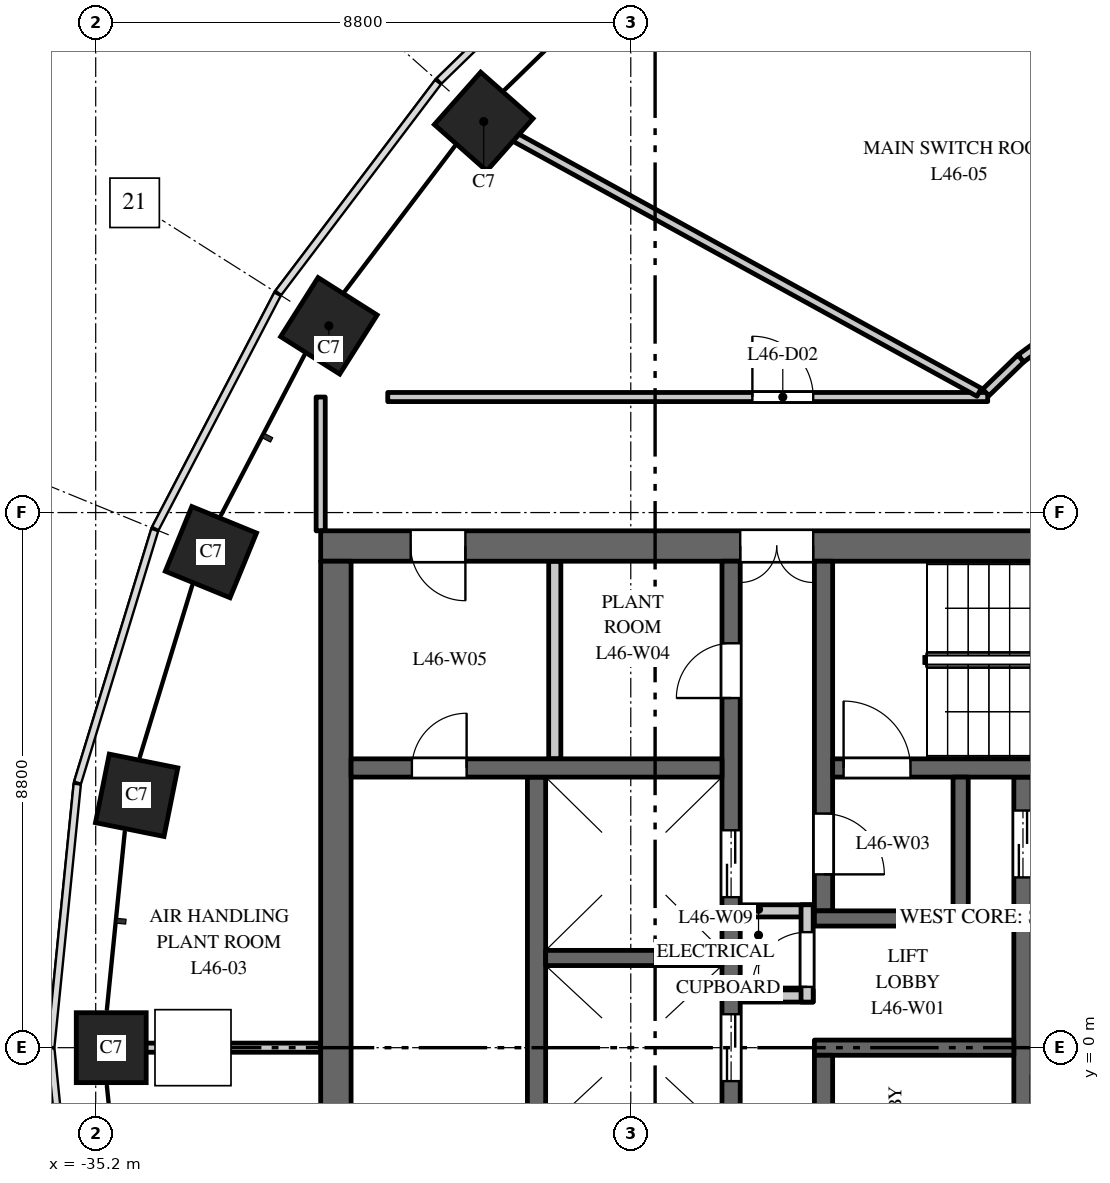
"""IFC4 building model, lengths in metres.
Left out: names, types, materials, properties, quantities, classifications, styles, units other than length and angle.
Written with IfcOpenShell. Run it as: python <this file> out.ifc"""

import sys

from ifc_helpers import new_model, si_unit, direction, frame, frame_2d, origin, origin_2d, place, context, subcontext, project, spatial, rectangle, extrude, element, fill, save


model = new_model("IFC4")
c1 = context("Model", 3, precision=1e-05, world=origin(), true_north=direction((0.0, 1.0)))
c2 = subcontext(c1, "Body", "Model", "MODEL_VIEW")
j1 = project(units=[si_unit("LENGTHUNIT", "METRE"), si_unit("PLANEANGLEUNIT", "RADIAN")], contexts=[c1])
p1 = place(None, origin())
s1 = spatial("IfcSite", under=j1, at=p1, CompositionType="ELEMENT")
p2 = place(p1, origin())
s2 = spatial("IfcBuilding", under=s1, at=p2, CompositionType="ELEMENT")
p3 = place(p2, frame((0.0, 0.0, 198.0)))
s3 = spatial("IfcBuildingStorey", under=s2, at=p3, CompositionType="ELEMENT", Elevation=198.0)
for number, where, z_axis, x_axis in (
    (1, (-28.819, 15.23, 0.0), (0.0, 0.0, 1.0), (-0.663, -0.749, 0.0)),
    (2, (-31.365, 11.871, 0.0), (0.0, 0.0, 1.0), (-0.535, -0.845, 0.0)),
    (3, (-33.305, 8.149, 0.0), (0.0, 0.0, 1.0), (-0.379, -0.925, 0.0)),
    (4, (-34.527, 4.151, 0.0), (0.0, 0.0, 1.0), (-0.197, -0.98, 0.0)),
    (5, (-34.945, 0.0, 0.0), (0.0, 0.0, 1.0), (0.0, -1.0, 0.0)),
):
    element("IfcColumn", number, at=place(p3, frame(where, z_axis=z_axis, x_axis=x_axis)), inside=s3, PredefinedType="COLUMN", context=c2, shape_type="SweptSolid", body=[
        extrude(rectangle(XDim=1.15, YDim=1.15, at=origin_2d()), origin(), (0.0, 0.0, 1.0), 5.5),
    ])
p4 = place(p3, frame((-16.5, 8.25, 0.0), z_axis=(0.0, 0.0, 1.0), x_axis=(-1.0, 0.0, 0.0)))
e6 = element("IfcWall", 6, at=p4, inside=s3, PredefinedType="SHEAR", context=c2, shape_type="SweptSolid", body=[
    extrude(rectangle(XDim=15.0, YDim=0.5, at=frame_2d((7.5, 0.0))), origin(), (0.0, 0.0, 1.0), 5.15),
])
p5 = place(p4, frame((6.9, 0.0, 0.0)))
e7 = element("IfcOpeningElement", 7, at=p5, cuts=e6, PredefinedType="OPENING", context=c2, shape_type="SweptSolid", body=[
    extrude(rectangle(XDim=1.2, YDim=2.1, at=frame_2d((0.6, 1.05))), frame((0.0, 0.26, 0.0), z_axis=(0.0, -1.0, 0.0), x_axis=(1.0, 0.0, 0.0)), (0.0, 0.0, 1.0), 0.52),
])
p6 = place(p4, frame((12.62, 0.0, 0.0)))
e8 = element("IfcOpeningElement", 8, at=p6, cuts=e6, PredefinedType="OPENING", context=c2, shape_type="SweptSolid", body=[
    extrude(rectangle(XDim=0.9, YDim=2.1, at=frame_2d((0.45, 1.05))), frame((0.0, 0.26, 0.0), z_axis=(0.0, -1.0, 0.0), x_axis=(1.0, 0.0, 0.0)), (0.0, 0.0, 1.0), 0.52),
])
p7 = place(p3, frame((-27.95, -4.45, 0.0), z_axis=(0.0, 0.0, 1.0), x_axis=(0.0, 1.0, 0.0)))
e9 = element("IfcWall", 9, at=p7, inside=s3, PredefinedType="SHEAR", context=c2, shape_type="SweptSolid", body=[
    extrude(rectangle(XDim=8.9, YDim=0.3, at=frame_2d((4.45, 0.0))), origin(), (0.0, 0.0, 1.0), 5.15),
])
p8 = place(p3, frame((-19.95, -4.45, 0.0), z_axis=(0.0, 0.0, 1.0), x_axis=(0.0, 1.0, 0.0)))
e10 = element("IfcWall", 10, at=p8, inside=s3, PredefinedType="SHEAR", context=c2, shape_type="SweptSolid", body=[
    extrude(rectangle(XDim=8.9, YDim=0.3, at=frame_2d((4.45, 0.0))), origin(), (0.0, 0.0, 1.0), 5.15),
])
p9 = place(p8, frame((0.775, 0.0, 0.0)))
e11 = element("IfcOpeningElement", 11, at=p9, cuts=e10, PredefinedType="OPENING", context=c2, shape_type="SweptSolid", body=[
    extrude(rectangle(XDim=1.2, YDim=2.1, at=frame_2d((0.6, 1.05))), frame((0.0, 0.16, 0.0), z_axis=(0.0, -1.0, 0.0), x_axis=(1.0, 0.0, 0.0)), (0.0, 0.0, 1.0), 0.32),
])
p10 = place(p8, frame((7.25, 0.0, 0.0)))
e12 = element("IfcOpeningElement", 12, at=p10, cuts=e10, PredefinedType="OPENING", context=c2, shape_type="SweptSolid", body=[
    extrude(rectangle(XDim=1.1, YDim=2.1, at=frame_2d((0.55, 1.05))), frame((0.0, 0.16, 0.0), z_axis=(0.0, -1.0, 0.0), x_axis=(1.0, 0.0, 0.0)), (0.0, 0.0, 1.0), 0.32),
])
p11 = place(p3, frame((-24.75, -8.0, 0.0), z_axis=(0.0, 0.0, 1.0), x_axis=(0.0, 1.0, 0.0)))
e13 = element("IfcWall", 13, at=p11, inside=s3, PredefinedType="SHEAR", context=c2, shape_type="SweptSolid", body=[
    extrude(rectangle(XDim=16.0, YDim=0.3, at=frame_2d((8.0, 0.0))), origin(), (0.0, 0.0, 1.0), 5.15),
])
p12 = place(p11, frame((4.425, 0.0, 0.0)))
e14 = element("IfcOpeningElement", 14, at=p12, cuts=e13, PredefinedType="OPENING", context=c2, shape_type="SweptSolid", body=[
    extrude(rectangle(XDim=1.1, YDim=2.1, at=frame_2d((0.55, 1.05))), frame((0.0, 0.16, 0.0), z_axis=(0.0, -1.0, 0.0), x_axis=(1.0, 0.0, 0.0)), (0.0, 0.0, 1.0), 0.32),
])
p13 = place(p11, frame((7.45, 0.0, 0.0)))
e15 = element("IfcOpeningElement", 15, at=p13, cuts=e13, PredefinedType="OPENING", context=c2, shape_type="SweptSolid", body=[
    extrude(rectangle(XDim=1.1, YDim=2.1, at=frame_2d((0.55, 1.05))), frame((0.0, 0.16, 0.0), z_axis=(0.0, -1.0, 0.0), x_axis=(1.0, 0.0, 0.0)), (0.0, 0.0, 1.0), 0.32),
])
p14 = place(p11, frame((10.475, 0.0, 0.0)))
e16 = element("IfcOpeningElement", 16, at=p14, cuts=e13, PredefinedType="OPENING", context=c2, shape_type="SweptSolid", body=[
    extrude(rectangle(XDim=1.1, YDim=2.1, at=frame_2d((0.55, 1.05))), frame((0.0, 0.16, 0.0), z_axis=(0.0, -1.0, 0.0), x_axis=(1.0, 0.0, 0.0)), (0.0, 0.0, 1.0), 0.32),
])
p15 = place(p11, frame((13.75, 0.0, 0.0)))
e17 = element("IfcOpeningElement", 17, at=p15, cuts=e13, PredefinedType="OPENING", context=c2, shape_type="SweptSolid", body=[
    extrude(rectangle(XDim=0.9, YDim=2.1, at=frame_2d((0.45, 1.05))), frame((0.0, 0.16, 0.0), z_axis=(0.0, -1.0, 0.0), x_axis=(1.0, 0.0, 0.0)), (0.0, 0.0, 1.0), 0.32),
])
p16 = place(p11, frame((1.975, 0.0, 0.0)))
e18 = element("IfcOpeningElement", 18, at=p16, cuts=e13, PredefinedType="OPENING", context=c2, shape_type="SweptSolid", body=[
    extrude(rectangle(XDim=0.9, YDim=2.1, at=frame_2d((0.45, 1.05))), frame((0.0, 0.16, 0.0), z_axis=(0.0, -1.0, 0.0), x_axis=(1.0, 0.0, 0.0)), (0.0, 0.0, 1.0), 0.32),
])
p17 = place(p11, frame((0.35, 0.0, 0.0)))
e19 = element("IfcOpeningElement", 19, at=p17, cuts=e13, PredefinedType="OPENING", context=c2, shape_type="SweptSolid", body=[
    extrude(rectangle(XDim=0.9, YDim=2.1, at=frame_2d((0.45, 1.05))), frame((0.0, 0.16, 0.0), z_axis=(0.0, -1.0, 0.0), x_axis=(1.0, 0.0, 0.0)), (0.0, 0.0, 1.0), 0.32),
])
p18 = place(p3, frame((-20.1, 0.0, 0.0), z_axis=(0.0, 0.0, 1.0), x_axis=(-1.0, 0.0, 0.0)))
e20 = element("IfcWall", 20, at=p18, inside=s3, PredefinedType="SHEAR", context=c2, shape_type="SweptSolid", body=[
    extrude(rectangle(XDim=3.28, YDim=0.25, at=frame_2d((1.64, 0.0))), origin(), (0.0, 0.0, 1.0), 5.15),
])
for number, where, z_axis, x_axis in (
    (21, (-23.4, 0.85, 0.0), (0.0, 0.0, 1.0), (-1.0, 0.0, 0.0)),
    (22, (-23.4, 2.25, 0.0), (0.0, 0.0, 1.0), (-1.0, 0.0, 0.0)),
):
    element("IfcWall", number, at=place(p3, frame(where, z_axis=z_axis, x_axis=x_axis)), inside=s3, PredefinedType="PARTITIONING", context=c2, shape_type="SweptSolid", body=[
        extrude(rectangle(XDim=1.2, YDim=0.2, at=frame_2d((0.6, 0.0))), origin(), (0.0, 0.0, 1.0), 5.15),
    ])
p19 = place(p3, frame((-23.5, 0.75, 0.0), z_axis=(0.0, 0.0, 1.0), x_axis=(0.0, 1.0, 0.0)))
e23 = element("IfcWall", 23, at=p19, inside=s3, PredefinedType="PARTITIONING", context=c2, shape_type="SweptSolid", body=[
    extrude(rectangle(XDim=1.6, YDim=0.2, at=frame_2d((0.8, 0.0))), origin(), (0.0, 0.0, 1.0), 5.15),
])
p20 = place(p19, frame((0.25, 0.0, 0.0)))
e24 = element("IfcOpeningElement", 24, at=p20, cuts=e23, PredefinedType="OPENING", context=c2, shape_type="SweptSolid", body=[
    extrude(rectangle(XDim=0.9, YDim=2.1, at=frame_2d((0.45, 1.05))), frame((0.0, 0.11, 0.0), z_axis=(0.0, -1.0, 0.0), x_axis=(1.0, 0.0, 0.0)), (0.0, 0.0, 1.0), 0.22),
])
p21 = place(p3, frame((-31.25, -8.0, 0.0), z_axis=(0.0, 0.0, 1.0), x_axis=(0.0, 1.0, 0.0)))
e25 = element("IfcWall", 25, at=p21, inside=s3, PredefinedType="SHEAR", context=c2, shape_type="SweptSolid", body=[
    extrude(rectangle(XDim=16.0, YDim=0.5, at=frame_2d((8.0, 0.0))), origin(), (0.0, 0.0, 1.0), 5.15),
])
p22 = place(p3, frame((-24.9, 4.6, 0.0), z_axis=(0.0, 0.0, 1.0), x_axis=(-1.0, 0.0, 0.0)))
e26 = element("IfcWall", 26, at=p22, inside=s3, PredefinedType="SHEAR", context=c2, shape_type="SweptSolid", body=[
    extrude(rectangle(XDim=6.1, YDim=0.3, at=frame_2d((3.05, 0.0))), origin(), (0.0, 0.0, 1.0), 5.15),
])
p23 = place(p22, frame((4.2, 0.0, 0.0)))
e27 = element("IfcOpeningElement", 27, at=p23, cuts=e26, PredefinedType="OPENING", context=c2, shape_type="SweptSolid", body=[
    extrude(rectangle(XDim=0.9, YDim=2.1, at=frame_2d((0.45, 1.05))), frame((0.0, 0.16, 0.0), z_axis=(0.0, -1.0, 0.0), x_axis=(1.0, 0.0, 0.0)), (0.0, 0.0, 1.0), 0.32),
])
p24 = place(p3, frame((-27.65, 4.75, 0.0), z_axis=(0.0, 0.0, 1.0), x_axis=(0.0, 1.0, 0.0)))
e28 = element("IfcWall", 28, at=p24, inside=s3, PredefinedType="PARTITIONING", context=c2, shape_type="SweptSolid", body=[
    extrude(rectangle(XDim=3.25, YDim=0.2, at=frame_2d((1.625, 0.0))), origin(), (0.0, 0.0, 1.0), 5.15),
])
p25 = place(p3, frame((-24.9, 1.475, 0.0), z_axis=(0.0, 0.0, 1.0), x_axis=(-1.0, 0.0, 0.0)))
e29 = element("IfcWall", 29, at=p25, inside=s3, PredefinedType="SHEAR", context=c2, shape_type="SweptSolid", body=[
    extrude(rectangle(XDim=2.9, YDim=0.25, at=frame_2d((1.45, 0.0))), origin(), (0.0, 0.0, 1.0), 5.15),
])
p26 = place(p3, frame((-23.23, 2.25, 0.0), z_axis=(0.0, 0.0, 1.0), x_axis=(0.0, 1.0, 0.0)))
e30 = element("IfcWall", 30, at=p26, inside=s3, PredefinedType="SHEAR", context=c2, shape_type="SweptSolid", body=[
    extrude(rectangle(XDim=5.75, YDim=0.3, at=frame_2d((2.875, 0.0))), origin(), (0.0, 0.0, 1.0), 5.15),
])
p27 = place(p26, frame((0.6, 0.0, 0.0)))
e31 = element("IfcOpeningElement", 31, at=p27, cuts=e30, PredefinedType="OPENING", context=c2, shape_type="SweptSolid", body=[
    extrude(rectangle(XDim=1.0, YDim=2.1, at=frame_2d((0.5, 1.05))), frame((0.0, 0.16, 0.0), z_axis=(0.0, -1.0, 0.0), x_axis=(1.0, 0.0, 0.0)), (0.0, 0.0, 1.0), 0.32),
])
p28 = place(p3, frame((-23.23, -8.0, 0.0), z_axis=(0.0, 0.0, 1.0), x_axis=(0.0, 1.0, 0.0)))
e32 = element("IfcWall", 32, at=p28, inside=s3, PredefinedType="SHEAR", context=c2, shape_type="SweptSolid", body=[
    extrude(rectangle(XDim=7.875, YDim=0.3, at=frame_2d((3.938, 0.0))), origin(), (0.0, 0.0, 1.0), 5.15),
])
p29 = place(p28, frame((5.15, 0.0, 0.0)))
e33 = element("IfcOpeningElement", 33, at=p29, cuts=e32, PredefinedType="OPENING", context=c2, shape_type="SweptSolid", body=[
    extrude(rectangle(XDim=1.1, YDim=2.1, at=frame_2d((0.55, 1.05))), frame((0.0, 0.16, 0.0), z_axis=(0.0, -1.0, 0.0), x_axis=(1.0, 0.0, 0.0)), (0.0, 0.0, 1.0), 0.32),
])
p30 = place(p3, frame((-16.9, 4.6, 0.0), z_axis=(0.0, 0.0, 1.0), x_axis=(-1.0, 0.0, 0.0)))
e34 = element("IfcWall", 34, at=p30, inside=s3, PredefinedType="SHEAR", context=c2, shape_type="SweptSolid", body=[
    extrude(rectangle(XDim=6.18, YDim=0.3, at=frame_2d((3.09, 0.0))), origin(), (0.0, 0.0, 1.0), 5.15),
])
p31 = place(p30, frame((4.9, 0.0, 0.0)))
e35 = element("IfcOpeningElement", 35, at=p31, cuts=e34, PredefinedType="OPENING", context=c2, shape_type="SweptSolid", body=[
    extrude(rectangle(XDim=1.1, YDim=2.1, at=frame_2d((0.55, 1.05))), frame((0.0, 0.16, 0.0), z_axis=(0.0, -1.0, 0.0), x_axis=(1.0, 0.0, 0.0)), (0.0, 0.0, 1.0), 0.32),
])
p32 = place(p3, frame((-20.85, 2.125, 0.0), z_axis=(0.0, 0.0, 1.0), x_axis=(-1.0, 0.0, 0.0)))
e36 = element("IfcWall", 36, at=p32, inside=s3, PredefinedType="SHEAR", context=c2, shape_type="SweptSolid", body=[
    extrude(rectangle(XDim=2.53, YDim=0.25, at=frame_2d((1.265, 0.0))), origin(), (0.0, 0.0, 1.0), 5.15),
])
p33 = place(p3, frame((-20.975, 2.25, 0.0), z_axis=(0.0, 0.0, 1.0), x_axis=(0.0, 1.0, 0.0)))
e37 = element("IfcWall", 37, at=p33, inside=s3, PredefinedType="SHEAR", context=c2, shape_type="SweptSolid", body=[
    extrude(rectangle(XDim=2.2, YDim=0.25, at=frame_2d((1.1, 0.0))), origin(), (0.0, 0.0, 1.0), 5.15),
])
p34 = place(p3, frame((-35.045, 0.0, 0.0), z_axis=(0.0, 0.0, 1.0), x_axis=(1.0, 0.0, 0.0)))
e38 = element("IfcWall", 38, at=p34, inside=s3, PredefinedType="PARTITIONING", context=c2, shape_type="SweptSolid", body=[
    extrude(rectangle(XDim=3.545, YDim=0.15, at=frame_2d((1.772, 0.0))), origin(), (0.0, 0.0, 1.0), 5.15),
])
p35 = place(p3, frame((-31.5, 8.5, 0.0), z_axis=(0.0, 0.0, 1.0), x_axis=(0.0, 1.0, 0.0)))
e39 = element("IfcWall", 39, at=p35, inside=s3, PredefinedType="PARTITIONING", context=c2, shape_type="SweptSolid", body=[
    extrude(rectangle(XDim=2.2, YDim=0.15, at=frame_2d((1.1, 0.0))), origin(), (0.0, 0.0, 1.0), 5.15),
])
p36 = place(p3, frame((-30.397, 10.7, 0.0), z_axis=(0.0, 0.0, 1.0), x_axis=(1.0, 0.0, 0.0)))
e40 = element("IfcWall", 40, at=p36, inside=s3, PredefinedType="PARTITIONING", context=c2, shape_type="SweptSolid", body=[
    extrude(rectangle(XDim=9.867, YDim=0.15, at=frame_2d((4.934, 0.0))), origin(), (0.0, 0.0, 1.0), 4.35),
])
p37 = place(p36, frame((5.997, 0.0, 0.0)))
e41 = element("IfcOpeningElement", 41, at=p37, cuts=e40, PredefinedType="OPENING", context=c2, shape_type="SweptSolid", body=[
    extrude(rectangle(XDim=1.0, YDim=2.1, at=frame_2d((0.5, 1.05))), frame((0.0, 0.085, 0.0), z_axis=(0.0, -1.0, 0.0), x_axis=(1.0, 0.0, 0.0)), (0.0, 0.0, 1.0), 0.17),
])
p38 = place(p3, frame((-28.893, 15.297, 0.0), z_axis=(0.0, 0.0, 1.0), x_axis=(0.876381760949, -0.481617077227, 0.0)))
e42 = element("IfcWall", 42, at=p38, inside=s3, PredefinedType="PARTITIONING", context=c2, shape_type="SweptSolid", body=[
    extrude(rectangle(XDim=9.383, YDim=0.15, at=frame_2d((4.691, 0.0))), origin(), (0.0, 0.0, 1.0), 5.15),
])
p39 = place(p3, frame((-20.561, 10.775, 0.0), z_axis=(0.0, 0.0, 1.0), x_axis=(0.717045449997, 0.697026414591, 0.0)))
e43 = element("IfcWall", 43, at=p39, inside=s3, PredefinedType="PARTITIONING", context=c2, shape_type="SweptSolid", body=[
    extrude(rectangle(XDim=0.805, YDim=0.15, at=frame_2d((0.402, 0.0))), origin(), (0.0, 0.0, 1.0), 5.15),
])
p40 = place(p3, frame((-19.984, 11.336, 0.0), z_axis=(0.0, 0.0, 1.0), x_axis=(0.805191029373, 0.593015519373, 0.0)))
e44 = element("IfcWall", 44, at=p40, inside=s3, PredefinedType="PARTITIONING", context=c2, shape_type="SweptSolid", body=[
    extrude(rectangle(XDim=3.086, YDim=0.15, at=frame_2d((1.543, 0.0))), origin(), (0.0, 0.0, 1.0), 4.2),
])
p41 = place(p10, origin())
e45 = element("IfcDoor", 45, at=p41, inside=s3, OperationType="DOUBLE_DOOR_SLIDING", PredefinedType="DOOR", context=c2, shape_type="SweptSolid", body=[
    extrude(rectangle(XDim=1.1, YDim=2.1, at=frame_2d((0.55, 1.05))), frame((0.0, 0.025, 0.0), z_axis=(0.0, -1.0, 0.0), x_axis=(1.0, 0.0, 0.0)), (0.0, 0.0, 1.0), 0.05),
])
fill(e12, e45)
p42 = place(p13, origin())
e46 = element("IfcDoor", 46, at=p42, inside=s3, OperationType="DOUBLE_DOOR_SLIDING", PredefinedType="DOOR", context=c2, shape_type="SweptSolid", body=[
    extrude(rectangle(XDim=1.1, YDim=2.1, at=frame_2d((0.55, 1.05))), frame((0.0, 0.025, 0.0), z_axis=(0.0, -1.0, 0.0), x_axis=(1.0, 0.0, 0.0)), (0.0, 0.0, 1.0), 0.05),
])
fill(e15, e46)
p43 = place(p14, origin())
e47 = element("IfcDoor", 47, at=p43, inside=s3, OperationType="DOUBLE_DOOR_SLIDING", PredefinedType="DOOR", context=c2, shape_type="SweptSolid", body=[
    extrude(rectangle(XDim=1.1, YDim=2.1, at=frame_2d((0.55, 1.05))), frame((0.0, 0.025, 0.0), z_axis=(0.0, -1.0, 0.0), x_axis=(1.0, 0.0, 0.0)), (0.0, 0.0, 1.0), 0.05),
])
fill(e16, e47)
p44 = place(p31, origin())
e48 = element("IfcDoor", 48, at=p44, inside=s3, OperationType="SINGLE_SWING_RIGHT", PredefinedType="DOOR", context=c2, shape_type="SweptSolid", body=[
    extrude(rectangle(XDim=1.1, YDim=2.1, at=frame_2d((0.55, 1.05))), frame((0.0, 0.025, 0.0), z_axis=(0.0, -1.0, 0.0), x_axis=(1.0, 0.0, 0.0)), (0.0, 0.0, 1.0), 0.05),
])
fill(e35, e48)
p45 = place(p27, origin())
e49 = element("IfcDoor", 49, at=p45, inside=s3, OperationType="SINGLE_SWING_LEFT", PredefinedType="DOOR", context=c2, shape_type="SweptSolid", body=[
    extrude(rectangle(XDim=1.0, YDim=2.1, at=frame_2d((0.5, 1.05))), frame((0.0, 0.025, 0.0), z_axis=(0.0, -1.0, 0.0), x_axis=(1.0, 0.0, 0.0)), (0.0, 0.0, 1.0), 0.05),
])
fill(e31, e49)
p46 = place(p5, origin())
e50 = element("IfcDoor", 50, at=p46, inside=s3, OperationType="DOUBLE_DOOR_DOUBLE_SWING", PredefinedType="DOOR", context=c2, shape_type="SweptSolid", body=[
    extrude(rectangle(XDim=1.2, YDim=2.1, at=frame_2d((0.6, 1.05))), frame((0.0, 0.025, 0.0), z_axis=(0.0, -1.0, 0.0), x_axis=(1.0, 0.0, 0.0)), (0.0, 0.0, 1.0), 0.05),
])
fill(e7, e50)
p47 = place(p15, origin())
e51 = element("IfcDoor", 51, at=p47, inside=s3, OperationType="SINGLE_SWING_RIGHT", PredefinedType="DOOR", context=c2, shape_type="SweptSolid", body=[
    extrude(rectangle(XDim=0.9, YDim=2.1, at=frame_2d((0.45, 1.05))), frame((0.0, 0.025, 0.0), z_axis=(0.0, -1.0, 0.0), x_axis=(1.0, 0.0, 0.0)), (0.0, 0.0, 1.0), 0.05),
])
fill(e17, e51)
p48 = place(p6, origin())
e52 = element("IfcDoor", 52, at=p48, inside=s3, OperationType="SINGLE_SWING_RIGHT", PredefinedType="DOOR", context=c2, shape_type="SweptSolid", body=[
    extrude(rectangle(XDim=0.9, YDim=2.1, at=frame_2d((0.45, 1.05))), frame((0.0, 0.025, 0.0), z_axis=(0.0, -1.0, 0.0), x_axis=(1.0, 0.0, 0.0)), (0.0, 0.0, 1.0), 0.05),
])
fill(e8, e52)
p49 = place(p20, origin())
e53 = element("IfcDoor", 53, at=p49, inside=s3, OperationType="SINGLE_SWING_RIGHT", PredefinedType="DOOR", context=c2, shape_type="SweptSolid", body=[
    extrude(rectangle(XDim=0.9, YDim=2.1, at=frame_2d((0.45, 1.05))), frame((0.0, 0.025, 0.0), z_axis=(0.0, -1.0, 0.0), x_axis=(1.0, 0.0, 0.0)), (0.0, 0.0, 1.0), 0.05),
])
fill(e24, e53)
p50 = place(p23, origin())
e54 = element("IfcDoor", 54, at=p50, inside=s3, OperationType="SINGLE_SWING_LEFT", PredefinedType="DOOR", context=c2, shape_type="SweptSolid", body=[
    extrude(rectangle(XDim=0.9, YDim=2.1, at=frame_2d((0.45, 1.05))), frame((0.0, 0.025, 0.0), z_axis=(0.0, -1.0, 0.0), x_axis=(1.0, 0.0, 0.0)), (0.0, 0.0, 1.0), 0.05),
])
fill(e27, e54)
p51 = place(p37, origin())
e55 = element("IfcDoor", 55, at=p51, inside=s3, OperationType="SINGLE_SWING_LEFT", PredefinedType="DOOR", context=c2, shape_type="SweptSolid", body=[
    extrude(rectangle(XDim=1.0, YDim=2.1, at=frame_2d((0.5, 1.05))), frame((0.0, 0.025, 0.0), z_axis=(0.0, -1.0, 0.0), x_axis=(1.0, 0.0, 0.0)), (0.0, 0.0, 1.0), 0.05),
])
fill(e41, e55)
save(model, sys.argv[1])
